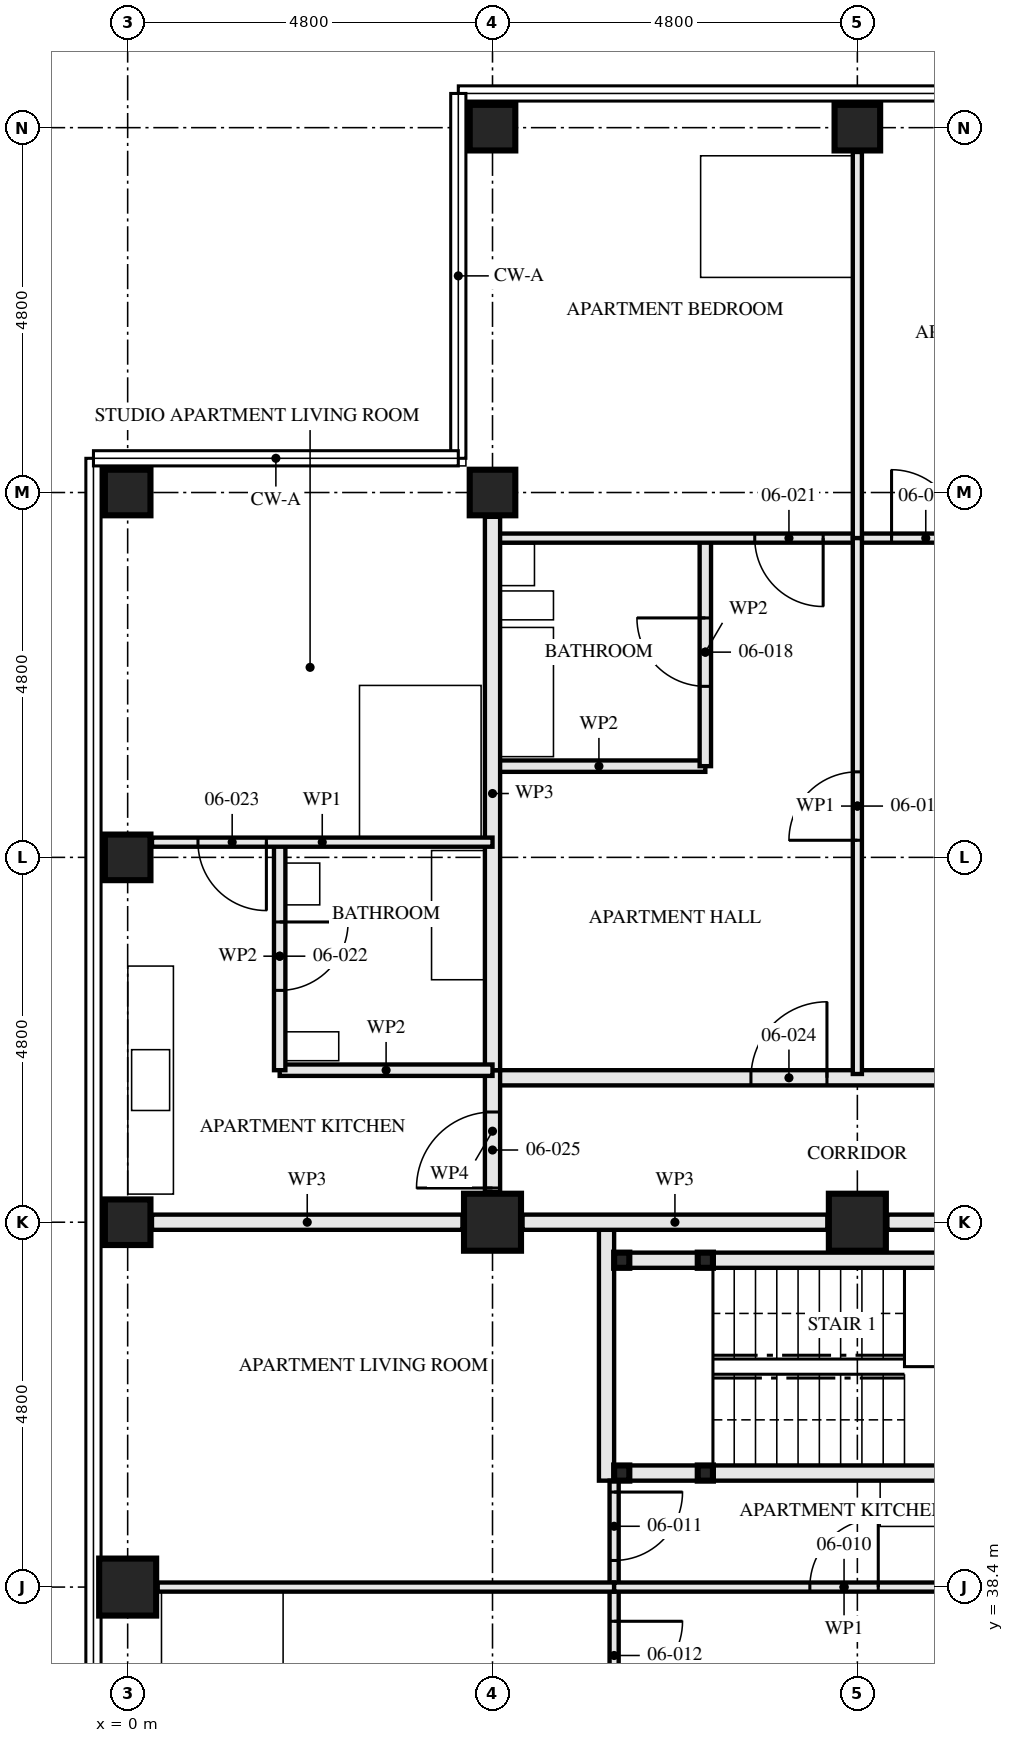
"""IFC4 building model, lengths in metres.
Left out: names, types, materials, properties, quantities, classifications, styles, units other than length and angle.
Written with IfcOpenShell. Run it as: python <this file> out.ifc"""

import sys

from ifc_helpers import new_model, si_unit, direction, frame, frame_2d, origin, origin_2d, place, context, subcontext, project, spatial, rectangle, hollow_rectangle, extrude, element, fill, save


model = new_model("IFC4")
c1 = context("Model", 3, precision=1e-05, world=origin(), true_north=direction((0.0, 1.0)))
c2 = subcontext(c1, "Body", "Model", "MODEL_VIEW")
j1 = project(units=[si_unit("LENGTHUNIT", "METRE"), si_unit("PLANEANGLEUNIT", "RADIAN")], contexts=[c1])
p1 = place(None, origin())
s1 = spatial("IfcSite", under=j1, at=p1, CompositionType="ELEMENT")
p2 = place(p1, origin())
s2 = spatial("IfcBuilding", under=s1, at=p2, CompositionType="ELEMENT")
p3 = place(p2, frame((0.0, 0.0, 27.0)))
s3 = spatial("IfcBuildingStorey", under=s2, at=p3, CompositionType="ELEMENT", Elevation=27.0)
p4 = place(p3, frame((0.0, 38.4, 0.0), z_axis=(0.0, 0.0, 1.0), x_axis=(1.0, 0.0, 0.0)))
e1 = element("IfcColumn", 1, at=p4, inside=s3, PredefinedType="COLUMN", context=c2, shape_type="SweptSolid", body=[
    extrude(hollow_rectangle(XDim=0.75, YDim=0.75, WallThickness=0.08, at=origin_2d()), origin(), (0.0, 0.0, 1.0), 3.5),
])
for number, where, z_axis, x_axis in (
    (2, (0.0, 43.2, 0.0), (0.0, 0.0, 1.0), (0.0, 1.0, 0.0)),
    (3, (0.0, 48.0, 0.0), (0.0, 0.0, 1.0), (1.0, 0.0, 0.0)),
    (4, (0.0, 52.8, 0.0), (0.0, 0.0, 1.0), (0.0, 1.0, 0.0)),
):
    element("IfcColumn", number, at=place(p3, frame(where, z_axis=z_axis, x_axis=x_axis)), inside=s3, PredefinedType="COLUMN", context=c2, shape_type="SweptSolid", body=[
        extrude(hollow_rectangle(XDim=0.6, YDim=0.6, WallThickness=0.08, at=origin_2d()), origin(), (0.0, 0.0, 1.0), 3.5),
    ])
p5 = place(p3, frame((4.8, 43.2, 0.0), z_axis=(0.0, 0.0, 1.0), x_axis=(0.0, 1.0, 0.0)))
e5 = element("IfcColumn", 5, at=p5, inside=s3, PredefinedType="COLUMN", context=c2, shape_type="SweptSolid", body=[
    extrude(hollow_rectangle(XDim=0.75, YDim=0.75, WallThickness=0.08, at=origin_2d()), origin(), (0.0, 0.0, 1.0), 3.5),
])
for number, where, z_axis, x_axis in (
    (6, (4.8, 52.8, 0.0), (0.0, 0.0, 1.0), (0.0, 1.0, 0.0)),
    (7, (4.8, 57.6, 0.0), (0.0, 0.0, 1.0), (0.0, 1.0, 0.0)),
):
    element("IfcColumn", number, at=place(p3, frame(where, z_axis=z_axis, x_axis=x_axis)), inside=s3, PredefinedType="COLUMN", context=c2, shape_type="SweptSolid", body=[
        extrude(hollow_rectangle(XDim=0.6, YDim=0.6, WallThickness=0.08, at=origin_2d()), origin(), (0.0, 0.0, 1.0), 3.5),
    ])
p6 = place(p3, frame((9.6, 43.2, 0.0), z_axis=(0.0, 0.0, 1.0), x_axis=(0.0, 1.0, 0.0)))
e8 = element("IfcColumn", 8, at=p6, inside=s3, PredefinedType="COLUMN", context=c2, shape_type="SweptSolid", body=[
    extrude(hollow_rectangle(XDim=0.75, YDim=0.75, WallThickness=0.08, at=origin_2d()), origin(), (0.0, 0.0, 1.0), 3.5),
])
p7 = place(p3, frame((9.6, 57.6, 0.0), z_axis=(0.0, 0.0, 1.0), x_axis=(0.0, 1.0, 0.0)))
e9 = element("IfcColumn", 9, at=p7, inside=s3, PredefinedType="COLUMN", context=c2, shape_type="SweptSolid", body=[
    extrude(hollow_rectangle(XDim=0.6, YDim=0.6, WallThickness=0.08, at=origin_2d()), origin(), (0.0, 0.0, 1.0), 3.5),
])
for number, where, z_axis, x_axis in (
    (10, (6.5, 42.7, 0.0), (0.0, 0.0, 1.0), (1.0, 0.0, 0.0)),
    (11, (6.5, 39.9, 0.0), (0.0, 0.0, 1.0), (1.0, 0.0, 0.0)),
    (12, (7.6, 42.7, 0.0), (0.0, 0.0, 1.0), (1.0, 0.0, 0.0)),
    (13, (7.6, 39.9, 0.0), (0.0, 0.0, 1.0), (1.0, 0.0, 0.0)),
):
    element("IfcColumn", number, at=place(p3, frame(where, z_axis=z_axis, x_axis=x_axis)), inside=s3, PredefinedType="COLUMN", context=c2, shape_type="SweptSolid", body=[
        extrude(hollow_rectangle(XDim=0.2, YDim=0.2, WallThickness=0.008, at=origin_2d()), origin(), (0.0, 0.0, 1.0), 3.33),
    ])
p8 = place(p3, frame((6.6, 42.7, 0.0), z_axis=(0.0, 0.0, 1.0), x_axis=(1.0, 0.0, 0.0)))
e14 = element("IfcWall", 14, at=p8, inside=s3, PredefinedType="SOLIDWALL", context=c2, shape_type="SweptSolid", body=[
    extrude(rectangle(XDim=0.9, YDim=0.2, at=frame_2d((0.45, 0.0))), origin(), (0.0, 0.0, 1.0), 2.99),
])
p9 = place(p3, frame((7.7, 42.7, 0.0), z_axis=(0.0, 0.0, 1.0), x_axis=(1.0, 0.0, 0.0)))
e15 = element("IfcWall", 15, at=p9, inside=s3, PredefinedType="SOLIDWALL", context=c2, shape_type="SweptSolid", body=[
    extrude(rectangle(XDim=4.7, YDim=0.2, at=frame_2d((2.35, 0.0))), origin(), (0.0, 0.0, 1.0), 2.99),
])
p10 = place(p3, frame((6.6, 39.9, 0.0), z_axis=(0.0, 0.0, 1.0), x_axis=(1.0, 0.0, 0.0)))
e16 = element("IfcWall", 16, at=p10, inside=s3, PredefinedType="SOLIDWALL", context=c2, shape_type="SweptSolid", body=[
    extrude(rectangle(XDim=0.9, YDim=0.2, at=frame_2d((0.45, 0.0))), origin(), (0.0, 0.0, 1.0), 2.99),
])
p11 = place(p3, frame((7.7, 39.9, 0.0), z_axis=(0.0, 0.0, 1.0), x_axis=(1.0, 0.0, 0.0)))
e17 = element("IfcWall", 17, at=p11, inside=s3, PredefinedType="SOLIDWALL", context=c2, shape_type="SweptSolid", body=[
    extrude(rectangle(XDim=4.7, YDim=0.2, at=frame_2d((2.35, 0.0))), origin(), (0.0, 0.0, 1.0), 2.99),
])
p12 = place(p3, frame((6.3, 43.1, 0.0), z_axis=(0.0, 0.0, 1.0), x_axis=(0.0, -1.0, 0.0)))
e18 = element("IfcWall", 18, at=p12, inside=s3, PredefinedType="SOLIDWALL", context=c2, shape_type="SweptSolid", body=[
    extrude(rectangle(XDim=3.3, YDim=0.2, at=frame_2d((1.65, 0.0))), origin(), (0.0, 0.0, 1.0), 3.33),
])
p13 = place(p3, frame((6.4, 38.4, 0.0), z_axis=(0.0, 0.0, 1.0), x_axis=(1.0, 0.0, 0.0)))
e19 = element("IfcWall", 19, at=p13, inside=s3, PredefinedType="PARTITIONING", context=c2, shape_type="SweptSolid", body=[
    extrude(rectangle(XDim=6.05, YDim=0.12, at=frame_2d((3.025, 0.0))), origin(), (0.0, 0.0, 1.0), 2.55),
])
p14 = place(p13, frame((2.575, 0.0, 0.0)))
e20 = element("IfcOpeningElement", 20, at=p14, cuts=e19, PredefinedType="OPENING", context=c2, shape_type="SweptSolid", body=[
    extrude(rectangle(XDim=0.9, YDim=2.1, at=frame_2d((0.45, 1.05))), frame((0.0, 0.071, 0.0), z_axis=(0.0, -1.0, 0.0), x_axis=(1.0, 0.0, 0.0)), (0.0, 0.0, 1.0), 0.141),
])
p15 = place(p3, frame((6.4, 39.8, 0.0), z_axis=(0.0, 0.0, 1.0), x_axis=(0.0, -1.0, 0.0)))
e21 = element("IfcWall", 21, at=p15, inside=s3, PredefinedType="PARTITIONING", context=c2, shape_type="SweptSolid", body=[
    extrude(rectangle(XDim=1.4, YDim=0.12, at=frame_2d((0.7, 0.0))), origin(), (0.0, 0.0, 1.0), 3.33),
])
p16 = place(p15, frame((0.15, 0.0, 0.0)))
e22 = element("IfcOpeningElement", 22, at=p16, cuts=e21, PredefinedType="OPENING", context=c2, shape_type="SweptSolid", body=[
    extrude(rectangle(XDim=0.9, YDim=2.1, at=frame_2d((0.45, 1.05))), frame((0.0, 0.071, 0.0), z_axis=(0.0, -1.0, 0.0), x_axis=(1.0, 0.0, 0.0)), (0.0, 0.0, 1.0), 0.141),
])
p17 = place(p3, frame((6.4, 38.4, 0.0), z_axis=(0.0, 0.0, 1.0), x_axis=(0.0, -1.0, 0.0)))
e23 = element("IfcWall", 23, at=p17, inside=s3, PredefinedType="PARTITIONING", context=c2, shape_type="SweptSolid", body=[
    extrude(rectangle(XDim=4.8, YDim=0.12, at=frame_2d((2.4, 0.0))), origin(), (0.0, 0.0, 1.0), 3.33),
])
p18 = place(p17, frame((0.45, 0.0, 0.0)))
e24 = element("IfcOpeningElement", 24, at=p18, cuts=e23, PredefinedType="OPENING", context=c2, shape_type="SweptSolid", body=[
    extrude(rectangle(XDim=0.9, YDim=2.1, at=frame_2d((0.45, 1.05))), frame((0.0, 0.071, 0.0), z_axis=(0.0, -1.0, 0.0), x_axis=(1.0, 0.0, 0.0)), (0.0, 0.0, 1.0), 0.141),
])
p19 = place(p3, frame((0.395, 38.4, 0.0), z_axis=(0.0, 0.0, 1.0), x_axis=(1.0, 0.0, 0.0)))
e25 = element("IfcWall", 25, at=p19, inside=s3, PredefinedType="PARTITIONING", context=c2, shape_type="SweptSolid", body=[
    extrude(rectangle(XDim=6.005, YDim=0.12, at=frame_2d((3.002, 0.0))), origin(), (0.0, 0.0, 1.0), 2.55),
])
p20 = place(p3, frame((7.6, 52.2, 0.0), z_axis=(0.0, 0.0, 1.0), x_axis=(0.0, -1.0, 0.0)))
e26 = element("IfcWall", 26, at=p20, inside=s3, PredefinedType="PARTITIONING", context=c2, shape_type="SweptSolid", body=[
    extrude(rectangle(XDim=3.0, YDim=0.15, at=frame_2d((1.5, 0.0))), origin(), (0.0, 0.0, 1.0), 3.33),
])
p21 = place(p20, frame((1.05, 0.0, 0.0)))
e27 = element("IfcOpeningElement", 27, at=p21, cuts=e26, PredefinedType="OPENING", context=c2, shape_type="SweptSolid", body=[
    extrude(rectangle(XDim=0.9, YDim=2.1, at=frame_2d((0.45, 1.05))), frame((0.0, 0.085, 0.0), z_axis=(0.0, -1.0, 0.0), x_axis=(1.0, 0.0, 0.0)), (0.0, 0.0, 1.0), 0.171),
])
p22 = place(p3, frame((7.6, 49.2, 0.0), z_axis=(0.0, 0.0, 1.0), x_axis=(-1.0, 0.0, 0.0)))
e28 = element("IfcWall", 28, at=p22, inside=s3, PredefinedType="PARTITIONING", context=c2, shape_type="SweptSolid", body=[
    extrude(rectangle(XDim=2.8, YDim=0.15, at=frame_2d((1.4, 0.0))), origin(), (0.0, 0.0, 1.0), 3.33),
])
p23 = place(p3, frame((9.6, 52.2, 0.0), z_axis=(0.0, 0.0, 1.0), x_axis=(0.0, -1.0, 0.0)))
e29 = element("IfcWall", 29, at=p23, inside=s3, PredefinedType="PARTITIONING", context=c2, shape_type="SweptSolid", body=[
    extrude(rectangle(XDim=7.05, YDim=0.12, at=frame_2d((3.525, 0.0))), origin(), (0.0, 0.0, 1.0), 2.55),
])
p24 = place(p23, frame((3.075, 0.0, 0.0)))
e30 = element("IfcOpeningElement", 30, at=p24, cuts=e29, PredefinedType="OPENING", context=c2, shape_type="SweptSolid", body=[
    extrude(rectangle(XDim=0.9, YDim=2.1, at=frame_2d((0.45, 1.05))), frame((0.0, 0.071, 0.0), z_axis=(0.0, -1.0, 0.0), x_axis=(1.0, 0.0, 0.0)), (0.0, 0.0, 1.0), 0.141),
])
p25 = place(p3, frame((14.4, 52.2, 0.0), z_axis=(0.0, 0.0, 1.0), x_axis=(-1.0, 0.0, 0.0)))
e31 = element("IfcWall", 31, at=p25, inside=s3, PredefinedType="PARTITIONING", context=c2, shape_type="SweptSolid", body=[
    extrude(rectangle(XDim=4.8, YDim=0.12, at=frame_2d((2.4, 0.0))), origin(), (0.0, 0.0, 1.0), 3.33),
])
p26 = place(p25, frame((3.45, 0.0, 0.0)))
e32 = element("IfcOpeningElement", 32, at=p26, cuts=e31, PredefinedType="OPENING", context=c2, shape_type="SweptSolid", body=[
    extrude(rectangle(XDim=0.9, YDim=2.1, at=frame_2d((0.45, 1.05))), frame((0.0, 0.071, 0.0), z_axis=(0.0, -1.0, 0.0), x_axis=(1.0, 0.0, 0.0)), (0.0, 0.0, 1.0), 0.141),
])
p27 = place(p3, frame((9.6, 52.2, 0.0), z_axis=(0.0, 0.0, 1.0), x_axis=(-1.0, 0.0, 0.0)))
e33 = element("IfcWall", 33, at=p27, inside=s3, PredefinedType="PARTITIONING", context=c2, shape_type="SweptSolid", body=[
    extrude(rectangle(XDim=4.8, YDim=0.12, at=frame_2d((2.4, 0.0))), origin(), (0.0, 0.0, 1.0), 3.33),
])
p28 = place(p27, frame((0.45, 0.0, 0.0)))
e34 = element("IfcOpeningElement", 34, at=p28, cuts=e33, PredefinedType="OPENING", context=c2, shape_type="SweptSolid", body=[
    extrude(rectangle(XDim=0.9, YDim=2.1, at=frame_2d((0.45, 1.05))), frame((0.0, 0.071, 0.0), z_axis=(0.0, -1.0, 0.0), x_axis=(1.0, 0.0, 0.0)), (0.0, 0.0, 1.0), 0.141),
])
p29 = place(p3, frame((9.6, 57.28, 0.0), z_axis=(0.0, 0.0, 1.0), x_axis=(0.0, -1.0, 0.0)))
e35 = element("IfcWall", 35, at=p29, inside=s3, PredefinedType="PARTITIONING", context=c2, shape_type="SweptSolid", body=[
    extrude(rectangle(XDim=5.08, YDim=0.12, at=frame_2d((2.54, 0.0))), origin(), (0.0, 0.0, 1.0), 2.55),
])
p30 = place(p3, frame((4.8, 52.48, 0.0), z_axis=(0.0, 0.0, 1.0), x_axis=(0.0, -1.0, 0.0)))
e36 = element("IfcWall", 36, at=p30, inside=s3, PredefinedType="PARTITIONING", context=c2, shape_type="SweptSolid", body=[
    extrude(rectangle(XDim=7.28, YDim=0.2, at=frame_2d((3.64, 0.0))), origin(), (0.0, 0.0, 1.0), 2.55),
])
p31 = place(p3, frame((2.0, 48.2, 0.0), z_axis=(0.0, 0.0, 1.0), x_axis=(0.0, -1.0, 0.0)))
e37 = element("IfcWall", 37, at=p31, inside=s3, PredefinedType="PARTITIONING", context=c2, shape_type="SweptSolid", body=[
    extrude(rectangle(XDim=3.0, YDim=0.15, at=frame_2d((1.5, 0.0))), origin(), (0.0, 0.0, 1.0), 2.55),
])
p32 = place(p31, frame((1.05, 0.0, 0.0)))
e38 = element("IfcOpeningElement", 38, at=p32, cuts=e37, PredefinedType="OPENING", context=c2, shape_type="SweptSolid", body=[
    extrude(rectangle(XDim=0.9, YDim=2.1, at=frame_2d((0.45, 1.05))), frame((0.0, 0.085, 0.0), z_axis=(0.0, -1.0, 0.0), x_axis=(1.0, 0.0, 0.0)), (0.0, 0.0, 1.0), 0.171),
])
p33 = place(p3, frame((4.8, 45.2, 0.0), z_axis=(0.0, 0.0, 1.0), x_axis=(-1.0, 0.0, 0.0)))
e39 = element("IfcWall", 39, at=p33, inside=s3, PredefinedType="PARTITIONING", context=c2, shape_type="SweptSolid", body=[
    extrude(rectangle(XDim=2.8, YDim=0.15, at=frame_2d((1.4, 0.0))), origin(), (0.0, 0.0, 1.0), 3.33),
])
p34 = place(p3, frame((4.8, 48.2, 0.0), z_axis=(0.0, 0.0, 1.0), x_axis=(-1.0, 0.0, 0.0)))
e40 = element("IfcWall", 40, at=p34, inside=s3, PredefinedType="PARTITIONING", context=c2, shape_type="SweptSolid", body=[
    extrude(rectangle(XDim=4.48, YDim=0.12, at=frame_2d((2.24, 0.0))), origin(), (0.0, 0.0, 1.0), 3.33),
])
p35 = place(p34, frame((2.975, 0.0, 0.0)))
e41 = element("IfcOpeningElement", 41, at=p35, cuts=e40, PredefinedType="OPENING", context=c2, shape_type="SweptSolid", body=[
    extrude(rectangle(XDim=0.9, YDim=2.1, at=frame_2d((0.45, 1.05))), frame((0.0, 0.071, 0.0), z_axis=(0.0, -1.0, 0.0), x_axis=(1.0, 0.0, 0.0)), (0.0, 0.0, 1.0), 0.141),
])
p36 = place(p3, frame((14.4, 45.1, 0.0), z_axis=(0.0, 0.0, 1.0), x_axis=(-1.0, 0.0, 0.0)))
e42 = element("IfcWall", 42, at=p36, inside=s3, PredefinedType="PARTITIONING", context=c2, shape_type="SweptSolid", body=[
    extrude(rectangle(XDim=9.6, YDim=0.2, at=frame_2d((4.8, 0.0))), origin(), (0.0, 0.0, 1.0), 3.33),
])
p37 = place(p36, frame((5.2, 0.0, 0.0)))
e43 = element("IfcOpeningElement", 43, at=p37, cuts=e42, PredefinedType="OPENING", context=c2, shape_type="SweptSolid", body=[
    extrude(rectangle(XDim=1.0, YDim=2.1, at=frame_2d((0.5, 1.05))), frame((0.0, 0.111, 0.0), z_axis=(0.0, -1.0, 0.0), x_axis=(1.0, 0.0, 0.0)), (0.0, 0.0, 1.0), 0.221),
])
p38 = place(p3, frame((4.8, 45.2, 0.0), z_axis=(0.0, 0.0, 1.0), x_axis=(0.0, -1.0, 0.0)))
e44 = element("IfcWall", 44, at=p38, inside=s3, PredefinedType="PARTITIONING", context=c2, shape_type="SweptSolid", body=[
    extrude(rectangle(XDim=1.605, YDim=0.2, at=frame_2d((0.802, 0.0))), origin(), (0.0, 0.0, 1.0), 3.33),
])
p39 = place(p38, frame((0.55, 0.0, 0.0)))
e45 = element("IfcOpeningElement", 45, at=p39, cuts=e44, PredefinedType="OPENING", context=c2, shape_type="SweptSolid", body=[
    extrude(rectangle(XDim=1.0, YDim=2.1, at=frame_2d((0.5, 1.05))), frame((0.0, 0.111, 0.0), z_axis=(0.0, -1.0, 0.0), x_axis=(1.0, 0.0, 0.0)), (0.0, 0.0, 1.0), 0.221),
])
p40 = place(p3, frame((12.5, 43.2, 0.0), z_axis=(0.0, 0.0, 1.0), x_axis=(-1.0, 0.0, 0.0)))
e46 = element("IfcWall", 46, at=p40, inside=s3, PredefinedType="PARTITIONING", context=c2, shape_type="SweptSolid", body=[
    extrude(rectangle(XDim=2.505, YDim=0.2, at=frame_2d((1.252, 0.0))), origin(), (0.0, 0.0, 1.0), 2.32),
])
p41 = place(p3, frame((9.205, 43.2, 0.0), z_axis=(0.0, 0.0, 1.0), x_axis=(-1.0, 0.0, 0.0)))
e47 = element("IfcWall", 47, at=p41, inside=s3, PredefinedType="PARTITIONING", context=c2, shape_type="SweptSolid", body=[
    extrude(rectangle(XDim=4.01, YDim=0.2, at=frame_2d((2.005, 0.0))), origin(), (0.0, 0.0, 1.0), 2.32),
])
p42 = place(p3, frame((4.405, 43.2, 0.0), z_axis=(0.0, 0.0, 1.0), x_axis=(-1.0, 0.0, 0.0)))
e48 = element("IfcWall", 48, at=p42, inside=s3, PredefinedType="PARTITIONING", context=c2, shape_type="SweptSolid", body=[
    extrude(rectangle(XDim=4.085, YDim=0.2, at=frame_2d((2.042, 0.0))), origin(), (0.0, 0.0, 1.0), 2.32),
])
p43 = place(p14, origin())
e49 = element("IfcDoor", 49, at=p43, inside=s3, OperationType="SINGLE_SWING_LEFT", PredefinedType="DOOR", context=c2, shape_type="SweptSolid", body=[
    extrude(rectangle(XDim=0.9, YDim=2.1, at=frame_2d((0.45, 1.05))), frame((0.0, 0.022, 0.0), z_axis=(0.0, -1.0, 0.0), x_axis=(1.0, 0.0, 0.0)), (0.0, 0.0, 1.0), 0.044),
])
fill(e20, e49)
p44 = place(p16, origin())
e50 = element("IfcDoor", 50, at=p44, inside=s3, OperationType="SINGLE_SWING_RIGHT", PredefinedType="DOOR", context=c2, shape_type="SweptSolid", body=[
    extrude(rectangle(XDim=0.9, YDim=2.1, at=frame_2d((0.45, 1.05))), frame((0.0, 0.022, 0.0), z_axis=(0.0, -1.0, 0.0), x_axis=(1.0, 0.0, 0.0)), (0.0, 0.0, 1.0), 0.044),
])
fill(e22, e50)
p45 = place(p18, origin())
e51 = element("IfcDoor", 51, at=p45, inside=s3, OperationType="SINGLE_SWING_RIGHT", PredefinedType="DOOR", context=c2, shape_type="SweptSolid", body=[
    extrude(rectangle(XDim=0.9, YDim=2.1, at=frame_2d((0.45, 1.05))), frame((0.0, 0.022, 0.0), z_axis=(0.0, -1.0, 0.0), x_axis=(1.0, 0.0, 0.0)), (0.0, 0.0, 1.0), 0.044),
])
fill(e24, e51)
p46 = place(p21, frame((0.9, 0.0, 0.0), z_axis=(0.0, 0.0, 1.0), x_axis=(-1.0, 0.0, 0.0)))
e52 = element("IfcDoor", 52, at=p46, inside=s3, OperationType="SINGLE_SWING_LEFT", PredefinedType="DOOR", context=c2, shape_type="SweptSolid", body=[
    extrude(rectangle(XDim=0.9, YDim=2.1, at=frame_2d((0.45, 1.05))), frame((0.0, 0.022, 0.0), z_axis=(0.0, -1.0, 0.0), x_axis=(1.0, 0.0, 0.0)), (0.0, 0.0, 1.0), 0.044),
])
fill(e27, e52)
p47 = place(p24, frame((0.9, 0.0, 0.0), z_axis=(0.0, 0.0, 1.0), x_axis=(-1.0, 0.0, 0.0)))
e53 = element("IfcDoor", 53, at=p47, inside=s3, OperationType="SINGLE_SWING_RIGHT", PredefinedType="DOOR", context=c2, shape_type="SweptSolid", body=[
    extrude(rectangle(XDim=0.9, YDim=2.1, at=frame_2d((0.45, 1.05))), frame((0.0, 0.022, 0.0), z_axis=(0.0, -1.0, 0.0), x_axis=(1.0, 0.0, 0.0)), (0.0, 0.0, 1.0), 0.044),
])
fill(e30, e53)
p48 = place(p26, frame((0.9, 0.0, 0.0), z_axis=(0.0, 0.0, 1.0), x_axis=(-1.0, 0.0, 0.0)))
e54 = element("IfcDoor", 54, at=p48, inside=s3, OperationType="SINGLE_SWING_RIGHT", PredefinedType="DOOR", context=c2, shape_type="SweptSolid", body=[
    extrude(rectangle(XDim=0.9, YDim=2.1, at=frame_2d((0.45, 1.05))), frame((0.0, 0.022, 0.0), z_axis=(0.0, -1.0, 0.0), x_axis=(1.0, 0.0, 0.0)), (0.0, 0.0, 1.0), 0.044),
])
fill(e32, e54)
p49 = place(p28, origin())
e55 = element("IfcDoor", 55, at=p49, inside=s3, OperationType="SINGLE_SWING_RIGHT", PredefinedType="DOOR", context=c2, shape_type="SweptSolid", body=[
    extrude(rectangle(XDim=0.9, YDim=2.1, at=frame_2d((0.45, 1.05))), frame((0.0, 0.022, 0.0), z_axis=(0.0, -1.0, 0.0), x_axis=(1.0, 0.0, 0.0)), (0.0, 0.0, 1.0), 0.044),
])
fill(e34, e55)
p50 = place(p32, origin())
e56 = element("IfcDoor", 56, at=p50, inside=s3, OperationType="SINGLE_SWING_RIGHT", PredefinedType="DOOR", context=c2, shape_type="SweptSolid", body=[
    extrude(rectangle(XDim=0.9, YDim=2.1, at=frame_2d((0.45, 1.05))), frame((0.0, 0.022, 0.0), z_axis=(0.0, -1.0, 0.0), x_axis=(1.0, 0.0, 0.0)), (0.0, 0.0, 1.0), 0.044),
])
fill(e38, e56)
p51 = place(p35, origin())
e57 = element("IfcDoor", 57, at=p51, inside=s3, OperationType="SINGLE_SWING_RIGHT", PredefinedType="DOOR", context=c2, shape_type="SweptSolid", body=[
    extrude(rectangle(XDim=0.9, YDim=2.1, at=frame_2d((0.45, 1.05))), frame((0.0, 0.022, 0.0), z_axis=(0.0, -1.0, 0.0), x_axis=(1.0, 0.0, 0.0)), (0.0, 0.0, 1.0), 0.044),
])
fill(e41, e57)
p52 = place(p37, frame((1.0, 0.0, 0.0), z_axis=(0.0, 0.0, 1.0), x_axis=(-1.0, 0.0, 0.0)))
e58 = element("IfcDoor", 58, at=p52, inside=s3, OperationType="SINGLE_SWING_LEFT", PredefinedType="DOOR", context=c2, shape_type="SweptSolid", body=[
    extrude(rectangle(XDim=1.0, YDim=2.1, at=frame_2d((0.5, 1.05))), frame((0.0, 0.027, 0.0), z_axis=(0.0, -1.0, 0.0), x_axis=(1.0, 0.0, 0.0)), (0.0, 0.0, 1.0), 0.054),
])
fill(e43, e58)
p53 = place(p39, frame((1.0, 0.0, 0.0), z_axis=(0.0, 0.0, 1.0), x_axis=(-1.0, 0.0, 0.0)))
e59 = element("IfcDoor", 59, at=p53, inside=s3, OperationType="SINGLE_SWING_RIGHT", PredefinedType="DOOR", context=c2, shape_type="SweptSolid", body=[
    extrude(rectangle(XDim=1.0, YDim=2.1, at=frame_2d((0.5, 1.05))), frame((0.0, 0.027, 0.0), z_axis=(0.0, -1.0, 0.0), x_axis=(1.0, 0.0, 0.0)), (0.0, 0.0, 1.0), 0.054),
])
fill(e45, e59)
save(model, sys.argv[1])
